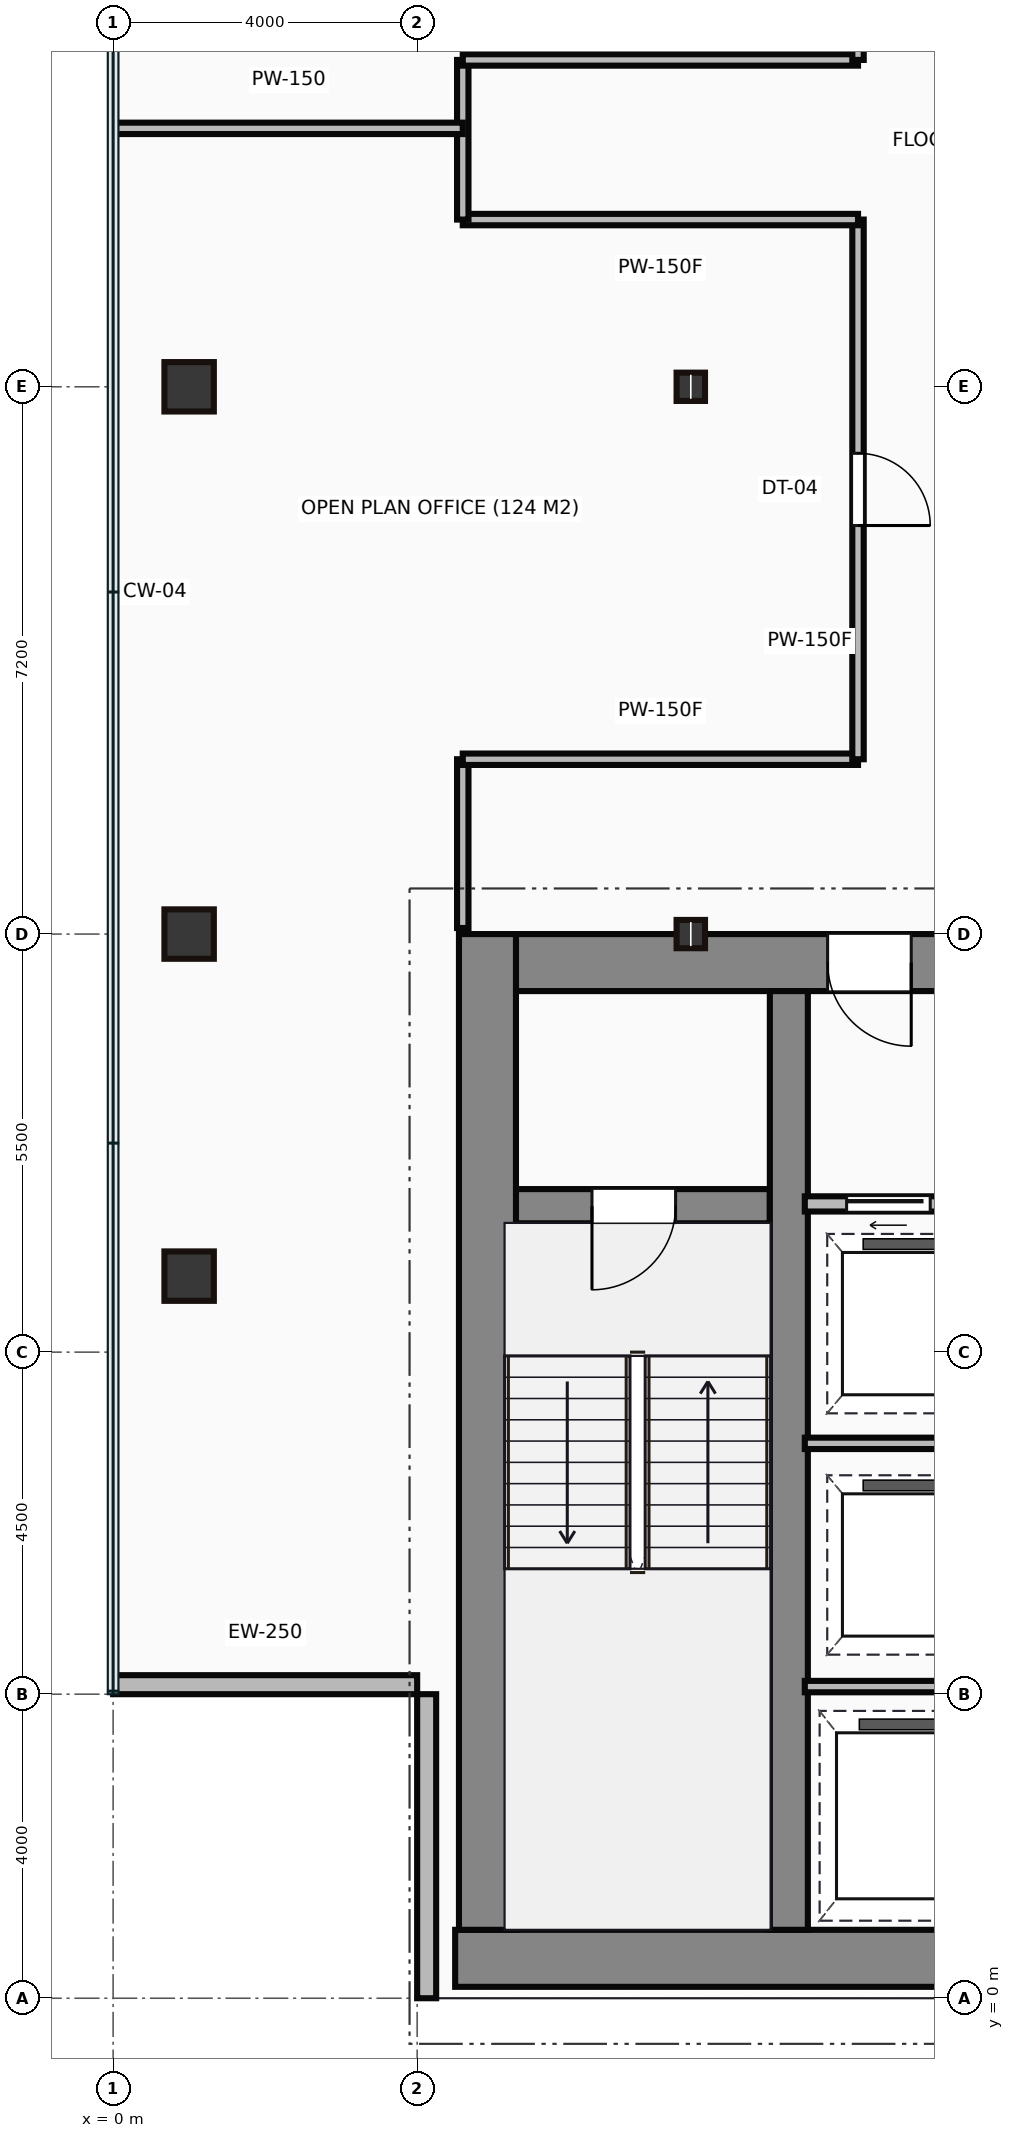
"""IFC4 building model, lengths in metres.
Left out: names, types, materials, properties, quantities, classifications, styles, units other than length and angle.
Written with IfcOpenShell. Run it as: python <this file> out.ifc"""

import sys

from ifc_helpers import new_model, si_unit, direction, frame, frame_2d, origin, origin_2d, place, context, subcontext, project, spatial, rectangle, hollow_rectangle, i_section, extrude, source, transform, mapped, element, fill, save


model = new_model("IFC4")
c1 = context("Model", 3, precision=1e-05, world=origin(), true_north=direction((0.0, 1.0)))
c2 = subcontext(c1, "Body", "Model", "MODEL_VIEW")
j1 = project(units=[si_unit("LENGTHUNIT", "METRE"), si_unit("PLANEANGLEUNIT", "RADIAN")], contexts=[c1])
p1 = place(None, origin())
s1 = spatial("IfcSite", under=j1, at=p1, CompositionType="ELEMENT")
p2 = place(p1, origin())
s2 = spatial("IfcBuilding", under=s1, at=p2, CompositionType="ELEMENT")
p3 = place(p2, frame((0.0, 0.0, 169.8)))
s3 = spatial("IfcBuildingStorey", under=s2, at=p3, CompositionType="ELEMENT", Elevation=169.8)
m1 = source(origin(), c2, "Body", "SweptSolid", [
    extrude(rectangle(XDim=29.5, YDim=0.75, at=frame_2d((14.75, 0.0))), origin(), (0.0, 0.0, 1.0), 3.65),
])
p4 = place(p3, frame((4.5, 0.525, 0.0), z_axis=(0.0, 0.0, 1.0), x_axis=(1.0, 0.0, 0.0)))
e1 = element("IfcWall", 1, at=p4, inside=s3, PredefinedType="SHEAR", context=c2, shape_type="MappedRepresentation", body=[
    mapped(m1, transform((0.0, 0.0, 0.0))),
])
m2 = source(origin(), c2, "Body", "SweptSolid", [
    extrude(rectangle(XDim=13.1, YDim=0.75, at=frame_2d((6.55, 0.0))), origin(), (0.0, 0.0, 1.0), 3.65),
])
p5 = place(p3, frame((4.925, 0.9, 0.0), z_axis=(0.0, 0.0, 1.0), x_axis=(0.0, 1.0, 0.0)))
e2 = element("IfcWall", 2, at=p5, inside=s3, PredefinedType="SHEAR", context=c2, shape_type="MappedRepresentation", body=[
    mapped(m2, transform((0.0, 0.0, 0.0))),
])
m3 = source(origin(), c2, "Body", "SweptSolid", [
    extrude(rectangle(XDim=9.1, YDim=0.75, at=frame_2d((4.55, 0.0))), origin(), (0.0, 0.0, 1.0), 3.65),
])
p6 = place(p3, frame((5.3, 13.625, 0.0), z_axis=(0.0, 0.0, 1.0), x_axis=(1.0, 0.0, 0.0)))
e3 = element("IfcWall", 3, at=p6, inside=s3, PredefinedType="SHEAR", context=c2, shape_type="MappedRepresentation", body=[
    mapped(m3, transform((0.0, 0.0, 0.0))),
])
p7 = place(p6, frame((4.1, 0.0, 0.0)))
e4 = element("IfcOpeningElement", 4, at=p7, cuts=e3, PredefinedType="OPENING", context=c2, shape_type="SweptSolid", body=[
    extrude(rectangle(XDim=1.1, YDim=2.15, at=frame_2d((0.55, 1.075))), frame((0.0, 0.385, 0.0), z_axis=(0.0, -1.0, 0.0), x_axis=(1.0, 0.0, 0.0)), (0.0, 0.0, 1.0), 0.77),
])
m4 = source(origin(), c2, "Body", "SweptSolid", [
    extrude(rectangle(XDim=12.35, YDim=0.5, at=frame_2d((6.175, 0.0))), origin(), (0.0, 0.0, 1.0), 3.65),
])
p8 = place(p3, frame((8.89, 0.9, 0.0), z_axis=(0.0, 0.0, 1.0), x_axis=(0.0, 1.0, 0.0)))
e5 = element("IfcWall", 5, at=p8, inside=s3, PredefinedType="SHEAR", context=c2, shape_type="MappedRepresentation", body=[
    mapped(m4, transform((0.0, 0.0, 0.0))),
])
m5 = source(origin(), c2, "Body", "SweptSolid", [
    extrude(rectangle(XDim=3.39, YDim=0.45, at=frame_2d((1.695, 0.0))), origin(), (0.0, 0.0, 1.0), 3.65),
])
p9 = place(p3, frame((5.25, 10.42, 0.0), z_axis=(0.0, 0.0, 1.0), x_axis=(1.0, 0.0, 0.0)))
e6 = element("IfcWall", 6, at=p9, inside=s3, PredefinedType="SHEAR", context=c2, shape_type="MappedRepresentation", body=[
    mapped(m5, transform((0.0, 0.0, 0.0))),
])
p10 = place(p9, frame((1.05, 0.0, 0.0)))
e7 = element("IfcOpeningElement", 7, at=p10, cuts=e6, PredefinedType="OPENING", context=c2, shape_type="SweptSolid", body=[
    extrude(rectangle(XDim=1.1, YDim=2.15, at=frame_2d((0.55, 1.075))), frame((0.0, 0.235, 0.0), z_axis=(0.0, -1.0, 0.0), x_axis=(1.0, 0.0, 0.0)), (0.0, 0.0, 1.0), 0.47),
])
m6 = source(origin(), c2, "Body", "SweptSolid", [
    extrude(hollow_rectangle(XDim=0.65, YDim=0.65, WallThickness=0.032, at=origin_2d()), origin(), (0.0, 0.0, 1.0), 3.65),
])
for number, where, z_axis, x_axis in (
    (8, (1.0, 9.5, 0.0), (0.0, 0.0, 1.0), (1.0, 0.0, 0.0)),
    (9, (1.0, 14.0, 0.0), (0.0, 0.0, 1.0), (1.0, 0.0, 0.0)),
    (10, (1.0, 21.2, 0.0), (0.0, 0.0, 1.0), (1.0, 0.0, 0.0)),
):
    element("IfcColumn", number, at=place(p3, frame(where, z_axis=z_axis, x_axis=x_axis)), inside=s3, PredefinedType="COLUMN", context=c2, shape_type="MappedRepresentation", body=[
        mapped(m6, transform((0.0, 0.0, 0.0))),
    ])
m7 = source(origin(), c2, "Body", "SweptSolid", [
    extrude(i_section(OverallWidth=0.374, OverallDepth=0.372, WebThickness=0.016, FlangeThickness=0.026, at=origin_2d()), origin(), (0.0, 0.0, 1.0), 3.65),
])
for number, where, z_axis, x_axis in (
    (11, (7.6, 14.0, 0.0), (0.0, 0.0, 1.0), (1.0, 0.0, 0.0)),
    (12, (7.6, 21.2, 0.0), (0.0, 0.0, 1.0), (1.0, 0.0, 0.0)),
):
    element("IfcColumn", number, at=place(p3, frame(where, z_axis=z_axis, x_axis=x_axis)), inside=s3, PredefinedType="COLUMN", context=c2, shape_type="MappedRepresentation", body=[
        mapped(m7, transform((0.0, 0.0, 0.0))),
    ])
m8 = source(origin(), c2, "Body", "SweptSolid", [
    extrude(rectangle(XDim=4.0, YDim=0.25, at=frame_2d((2.0, 0.0))), origin(), (0.0, 0.0, 1.0), 3.4),
])
for number, where, z_axis, x_axis in (
    (13, (0.0, 4.125, 0.0), (0.0, 0.0, 1.0), (1.0, 0.0, 0.0)),
    (14, (4.125, 4.0, 0.0), (0.0, 0.0, 1.0), (0.0, -1.0, 0.0)),
):
    element("IfcWall", number, at=place(p3, frame(where, z_axis=z_axis, x_axis=x_axis)), inside=s3, PredefinedType="STANDARD", context=c2, shape_type="MappedRepresentation", body=[
        mapped(m8, transform((0.0, 0.0, 0.0))),
    ])
m9 = source(origin(), c2, "Body", "SweptSolid", [
    extrude(rectangle(XDim=2.35, YDim=0.2, at=frame_2d((1.175, 0.0))), origin(), (0.0, 0.0, 1.0), 3.4),
])
p11 = place(p3, frame((9.1, 10.45, 0.0), z_axis=(0.0, 0.0, 1.0), x_axis=(1.0, 0.0, 0.0)))
e15 = element("IfcWall", 15, at=p11, inside=s3, PredefinedType="PARTITIONING", context=c2, shape_type="MappedRepresentation", body=[
    mapped(m9, transform((0.0, 0.0, 0.0))),
])
p12 = place(p11, frame((0.55, 0.0, 0.0)))
e16 = element("IfcOpeningElement", 16, at=p12, cuts=e15, PredefinedType="OPENING", context=c2, shape_type="SweptSolid", body=[
    extrude(rectangle(XDim=1.1, YDim=2.15, at=frame_2d((0.55, 1.075))), frame((0.0, 0.11, 0.0), z_axis=(0.0, -1.0, 0.0), x_axis=(1.0, 0.0, 0.0)), (0.0, 0.0, 1.0), 0.22),
])
m10 = source(origin(), c2, "Body", "SweptSolid", [
    extrude(rectangle(XDim=2.4, YDim=0.15, at=frame_2d((1.2, 0.0))), origin(), (0.0, 0.0, 1.0), 3.4),
])
for number, where, z_axis, x_axis in (
    (17, (9.1, 4.1, 0.0), (0.0, 0.0, 1.0), (1.0, 0.0, 0.0)),
    (18, (9.1, 7.3, 0.0), (0.0, 0.0, 1.0), (1.0, 0.0, 0.0)),
):
    element("IfcWall", number, at=place(p3, frame(where, z_axis=z_axis, x_axis=x_axis)), inside=s3, PredefinedType="PARTITIONING", context=c2, shape_type="MappedRepresentation", body=[
        mapped(m10, transform((0.0, 0.0, 0.0))),
    ])
m11 = source(origin(), c2, "Body", "SweptSolid", [
    extrude(rectangle(XDim=2.22, YDim=0.15, at=frame_2d((1.11, 0.0))), origin(), (0.0, 0.0, 1.0), 3.4),
])
p13 = place(p3, frame((4.6, 14.08, 0.0), z_axis=(0.0, 0.0, 1.0), x_axis=(0.0, 1.0, 0.0)))
e19 = element("IfcWall", 19, at=p13, inside=s3, PredefinedType="PARTITIONING", context=c2, shape_type="MappedRepresentation", body=[
    mapped(m11, transform((0.0, 0.0, 0.0))),
])
m12 = source(origin(), c2, "Body", "SweptSolid", [
    extrude(rectangle(XDim=5.2, YDim=0.15, at=frame_2d((2.6, 0.0))), origin(), (0.0, 0.0, 1.0), 3.4),
])
p14 = place(p3, frame((4.6, 16.3, 0.0), z_axis=(0.0, 0.0, 1.0), x_axis=(1.0, 0.0, 0.0)))
e20 = element("IfcWall", 20, at=p14, inside=s3, PredefinedType="PARTITIONING", context=c2, shape_type="MappedRepresentation", body=[
    mapped(m12, transform((0.0, 0.0, 0.0))),
])
m13 = source(origin(), c2, "Body", "SweptSolid", [
    extrude(rectangle(XDim=7.1, YDim=0.15, at=frame_2d((3.55, 0.0))), origin(), (0.0, 0.0, 1.0), 3.4),
])
p15 = place(p3, frame((9.8, 16.3, 0.0), z_axis=(0.0, 0.0, 1.0), x_axis=(0.0, 1.0, 0.0)))
e21 = element("IfcWall", 21, at=p15, inside=s3, PredefinedType="PARTITIONING", context=c2, shape_type="MappedRepresentation", body=[
    mapped(m13, transform((0.0, 0.0, 0.0))),
])
p16 = place(p15, frame((3.075, 0.0, 0.0)))
e22 = element("IfcOpeningElement", 22, at=p16, cuts=e21, PredefinedType="OPENING", context=c2, shape_type="SweptSolid", body=[
    extrude(rectangle(XDim=0.95, YDim=2.15, at=frame_2d((0.475, 1.075))), frame((0.0, 0.085, 0.0), z_axis=(0.0, -1.0, 0.0), x_axis=(1.0, 0.0, 0.0)), (0.0, 0.0, 1.0), 0.17),
])
m14 = source(origin(), c2, "Body", "SweptSolid", [
    extrude(rectangle(XDim=5.2, YDim=0.15, at=frame_2d((2.6, 0.0))), origin(), (0.0, 0.0, 1.0), 3.041),
])
p17 = place(p3, frame((9.8, 23.4, 0.0), z_axis=(0.0, 0.0, 1.0), x_axis=(-1.0, 0.0, 0.0)))
e23 = element("IfcWall", 23, at=p17, inside=s3, PredefinedType="PARTITIONING", context=c2, shape_type="MappedRepresentation", body=[
    mapped(m14, transform((0.0, 0.0, 0.0))),
])
m15 = source(origin(), c2, "Body", "SweptSolid", [
    extrude(rectangle(XDim=2.1, YDim=0.15, at=frame_2d((1.05, 0.0))), origin(), (0.0, 0.0, 1.0), 3.4),
])
p18 = place(p3, frame((4.6, 23.4, 0.0), z_axis=(0.0, 0.0, 1.0), x_axis=(0.0, 1.0, 0.0)))
e24 = element("IfcWall", 24, at=p18, inside=s3, PredefinedType="PARTITIONING", context=c2, shape_type="MappedRepresentation", body=[
    mapped(m15, transform((0.0, 0.0, 0.0))),
])
p19 = place(p3, frame((4.6, 25.5, 0.0), z_axis=(0.0, 0.0, 1.0), x_axis=(1.0, 0.0, 0.0)))
e25 = element("IfcWall", 25, at=p19, inside=s3, PredefinedType="PARTITIONING", context=c2, shape_type="MappedRepresentation", body=[
    mapped(m14, transform((0.0, 0.0, 0.0))),
])
m16 = source(origin(), c2, "Body", "SweptSolid", [
    extrude(rectangle(XDim=9.0, YDim=0.15, at=frame_2d((4.5, 0.0))), origin(), (0.0, 0.0, 1.0), 3.4),
])
p20 = place(p3, frame((9.8, 25.5, 0.0), z_axis=(0.0, 0.0, 1.0), x_axis=(0.0, 1.0, 0.0)))
e26 = element("IfcWall", 26, at=p20, inside=s3, PredefinedType="PARTITIONING", context=c2, shape_type="MappedRepresentation", body=[
    mapped(m16, transform((0.0, 0.0, 0.0))),
])
p21 = place(p20, frame((3.305, 0.0, 0.0)))
e27 = element("IfcOpeningElement", 27, at=p21, cuts=e26, PredefinedType="OPENING", context=c2, shape_type="SweptSolid", body=[
    extrude(rectangle(XDim=0.95, YDim=2.15, at=frame_2d((0.475, 1.075))), frame((0.0, 0.085, 0.0), z_axis=(0.0, -1.0, 0.0), x_axis=(1.0, 0.0, 0.0)), (0.0, 0.0, 1.0), 0.17),
])
m17 = source(origin(), c2, "Body", "SweptSolid", [
    extrude(rectangle(XDim=4.58, YDim=0.15, at=frame_2d((2.29, 0.0))), origin(), (0.0, 0.0, 1.0), 3.4),
])
p22 = place(p3, frame((0.02, 24.6, 0.0), z_axis=(0.0, 0.0, 1.0), x_axis=(1.0, 0.0, 0.0)))
e28 = element("IfcWall", 28, at=p22, inside=s3, PredefinedType="PARTITIONING", context=c2, shape_type="MappedRepresentation", body=[
    mapped(m17, transform((0.0, 0.0, 0.0))),
])
m18 = source(origin(), c2, "Body", "SweptSolid", [
    extrude(rectangle(XDim=1.1, YDim=2.15, at=frame_2d((0.55, 1.075))), frame((0.0, 0.025, 0.0), z_axis=(0.0, -1.0, 0.0), x_axis=(1.0, 0.0, 0.0)), (0.0, 0.0, 1.0), 0.05),
])
p23 = place(p10, frame((1.1, 0.0, 0.0), z_axis=(0.0, 0.0, 1.0), x_axis=(-1.0, 0.0, 0.0)))
e29 = element("IfcDoor", 29, at=p23, inside=s3, OperationType="SINGLE_SWING_LEFT", PredefinedType="DOOR", context=c2, shape_type="MappedRepresentation", body=[
    mapped(m18, transform((0.0, 0.0, 0.0))),
])
fill(e7, e29)
p24 = place(p7, origin())
e30 = element("IfcDoor", 30, at=p24, inside=s3, OperationType="SINGLE_SWING_RIGHT", PredefinedType="DOOR", context=c2, shape_type="MappedRepresentation", body=[
    mapped(m18, transform((0.0, 0.0, 0.0))),
])
fill(e4, e30)
p25 = place(p12, origin())
e31 = element("IfcDoor", 31, at=p25, inside=s3, OperationType="SLIDING_TO_LEFT", PredefinedType="DOOR", context=c2, shape_type="MappedRepresentation", body=[
    mapped(m18, transform((0.0, 0.0, 0.0))),
])
fill(e16, e31)
m19 = source(origin(), c2, "Body", "SweptSolid", [
    extrude(rectangle(XDim=0.95, YDim=2.15, at=frame_2d((0.475, 1.075))), frame((0.0, 0.025, 0.0), z_axis=(0.0, -1.0, 0.0), x_axis=(1.0, 0.0, 0.0)), (0.0, 0.0, 1.0), 0.05),
])
p26 = place(p16, origin())
e32 = element("IfcDoor", 32, at=p26, inside=s3, OperationType="SINGLE_SWING_LEFT", PredefinedType="DOOR", context=c2, shape_type="MappedRepresentation", body=[
    mapped(m19, transform((0.0, 0.0, 0.0))),
])
fill(e22, e32)
save(model, sys.argv[1])
